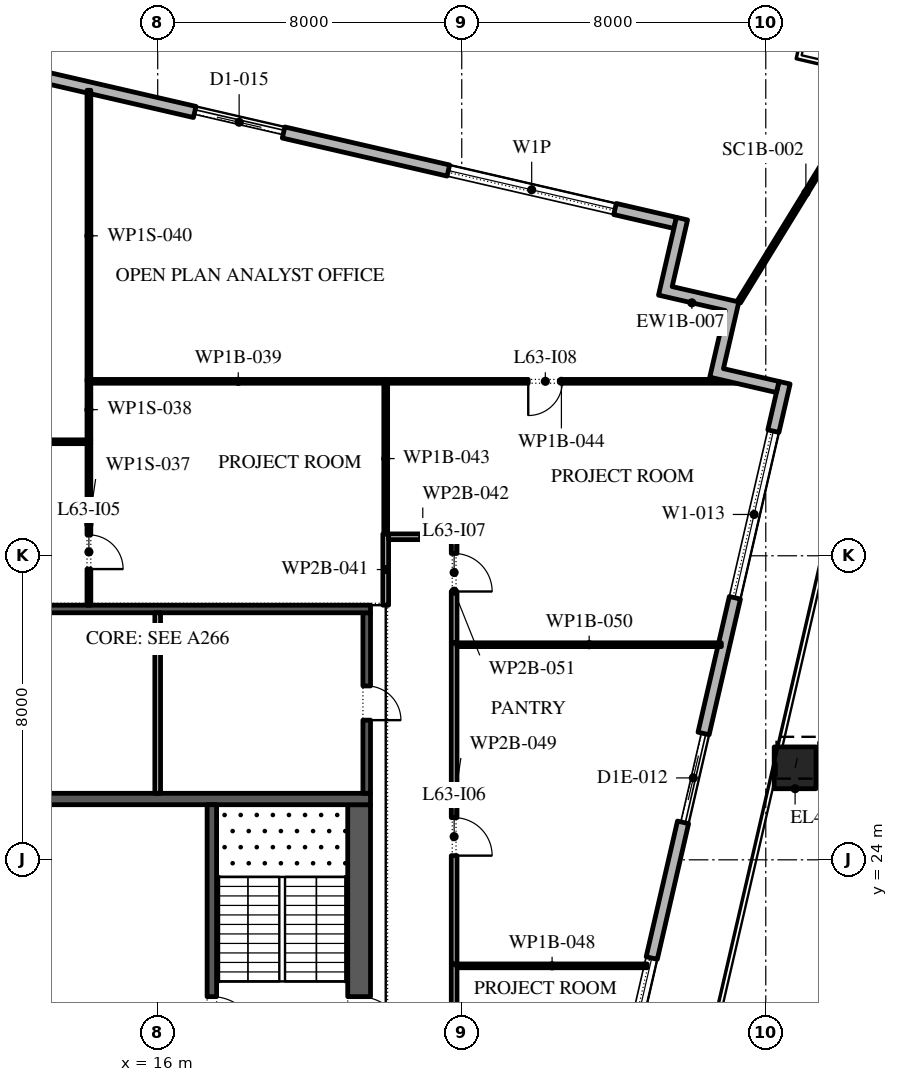
"""IFC4 building model, lengths in metres.
Left out: names, types, materials, properties, quantities, classifications, styles, units other than length and angle.
Written with IfcOpenShell. Run it as: python <this file> out.ifc"""

import sys

from ifc_helpers import new_model, si_unit, direction, frame, frame_2d, origin, origin_2d, place, context, subcontext, project, spatial, polyline, rectangle, outline, extrude, element, fill, save


model = new_model("IFC4")
c1 = context("Model", 3, precision=1e-05, world=origin(), true_north=direction((0.0, 1.0)))
c2 = subcontext(c1, "Body", "Model", "MODEL_VIEW")
j1 = project(units=[si_unit("LENGTHUNIT", "METRE"), si_unit("PLANEANGLEUNIT", "RADIAN")], contexts=[c1])
p1 = place(None, origin())
s1 = spatial("IfcSite", under=j1, at=p1, CompositionType="ELEMENT")
p2 = place(p1, origin())
s2 = spatial("IfcBuilding", under=s1, at=p2, CompositionType="ELEMENT")
p3 = place(p2, frame((0.0, 0.0, 289.2)))
s3 = spatial("IfcBuildingStorey", under=s2, at=p3, CompositionType="ELEMENT", Elevation=289.2)
p4 = place(p3, frame((32.772, 26.421, 0.0), z_axis=(0.014559841898, 0.063111984005, 0.997900239743), x_axis=(-0.97440628778, 0.224794097641, 0.0)))
e1 = element("IfcColumn", 1, at=p4, inside=s3, PredefinedType="COLUMN", context=c2, shape_type="SweptSolid", body=[
    extrude(rectangle(XDim=1.1, YDim=1.1, at=origin_2d()), origin(), (0.0, 0.0, 1.0), 4.209),
])
p5 = place(p3, frame((21.359, -11.678, 0.0), z_axis=(0.0, 0.0, 1.0), x_axis=(0.224949198343, 0.974370493275, 0.0)))
e2 = element("IfcWall", 2, at=p5, inside=s3, PredefinedType="STANDARD", context=c2, shape_type="SweptSolid", body=[
    extrude(rectangle(XDim=49.5, YDim=0.3, at=frame_2d((24.75, 0.0))), origin(), (0.0, 0.0, 1.0), 3.95),
])
p6 = place(p5, frame((1.157, 0.0, 0.45)))
e3 = element("IfcOpeningElement", 3, at=p6, cuts=e2, PredefinedType="OPENING", context=c2, shape_type="SweptSolid", body=[
    extrude(rectangle(XDim=4.5, YDim=3.05, at=frame_2d((2.25, 1.525))), frame((0.0, 0.16, 0.0), z_axis=(0.0, -1.0, 0.0), x_axis=(1.0, 0.0, 0.0)), (0.0, 0.0, 1.0), 0.32),
])
p7 = place(p5, frame((8.121, 0.0, 0.45)))
e4 = element("IfcOpeningElement", 4, at=p7, cuts=e2, PredefinedType="OPENING", context=c2, shape_type="SweptSolid", body=[
    extrude(rectangle(XDim=4.5, YDim=3.05, at=frame_2d((2.25, 1.525))), frame((0.0, 0.16, 0.0), z_axis=(0.0, -1.0, 0.0), x_axis=(1.0, 0.0, 0.0)), (0.0, 0.0, 1.0), 0.32),
])
p8 = place(p5, frame((15.236, 0.0, 0.45)))
e5 = element("IfcOpeningElement", 5, at=p8, cuts=e2, PredefinedType="OPENING", context=c2, shape_type="SweptSolid", body=[
    extrude(rectangle(XDim=4.5, YDim=3.05, at=frame_2d((2.25, 1.525))), frame((0.0, 0.16, 0.0), z_axis=(0.0, -1.0, 0.0), x_axis=(1.0, 0.0, 0.0)), (0.0, 0.0, 1.0), 0.32),
])
p9 = place(p5, frame((22.35, 0.0, 0.45)))
e6 = element("IfcOpeningElement", 6, at=p9, cuts=e2, PredefinedType="OPENING", context=c2, shape_type="SweptSolid", body=[
    extrude(rectangle(XDim=4.5, YDim=3.0, at=frame_2d((2.25, 1.5))), frame((0.0, 0.16, 0.0), z_axis=(0.0, -1.0, 0.0), x_axis=(1.0, 0.0, 0.0)), (0.0, 0.0, 1.0), 0.32),
])
p10 = place(p5, frame((29.464, 0.0, 0.45)))
e7 = element("IfcOpeningElement", 7, at=p10, cuts=e2, PredefinedType="OPENING", context=c2, shape_type="SweptSolid", body=[
    extrude(rectangle(XDim=4.5, YDim=2.9, at=frame_2d((2.25, 1.45))), frame((0.0, 0.16, 0.0), z_axis=(0.0, -1.0, 0.0), x_axis=(1.0, 0.0, 0.0)), (0.0, 0.0, 1.0), 0.32),
])
p11 = place(p5, frame((37.628, 0.0, 0.0)))
e8 = element("IfcOpeningElement", 8, at=p11, cuts=e2, PredefinedType="OPENING", context=c2, shape_type="SweptSolid", body=[
    extrude(rectangle(XDim=2.4, YDim=3.275, at=frame_2d((1.2, 1.637))), frame((0.0, 0.16, 0.0), z_axis=(0.0, -1.0, 0.0), x_axis=(1.0, 0.0, 0.0)), (0.0, 0.0, 1.0), 0.32),
])
p12 = place(p5, frame((43.693, 0.0, 0.45)))
e9 = element("IfcOpeningElement", 9, at=p12, cuts=e2, PredefinedType="OPENING", context=c2, shape_type="SweptSolid", body=[
    extrude(rectangle(XDim=4.5, YDim=3.05, at=frame_2d((2.25, 1.525))), frame((0.0, 0.16, 0.0), z_axis=(0.0, -1.0, 0.0), x_axis=(1.0, 0.0, 0.0)), (0.0, 0.0, 1.0), 0.32),
])
p13 = place(p3, frame((29.616, 40.758, 0.0), z_axis=(0.0, 0.0, 1.0), x_axis=(-0.974370532314, 0.224949029246, 0.0)))
e10 = element("IfcWall", 10, at=p13, inside=s3, PredefinedType="STANDARD", context=c2, shape_type="SweptSolid", body=[
    extrude(rectangle(XDim=48.0, YDim=0.3, at=frame_2d((24.0, 0.0))), origin(), (0.0, 0.0, 1.0), 3.95),
])
p14 = place(p13, frame((1.625, 0.0, 0.45)))
e11 = element("IfcOpeningElement", 11, at=p14, cuts=e10, PredefinedType="OPENING", context=c2, shape_type="SweptSolid", body=[
    extrude(rectangle(XDim=4.5, YDim=2.475, at=frame_2d((2.25, 1.238))), frame((0.0, 0.16, 0.0), z_axis=(0.0, -1.0, 0.0), x_axis=(1.0, 0.0, 0.0)), (0.0, 0.0, 1.0), 0.32),
])
p15 = place(p13, frame((10.575, 0.0, 0.0)))
e12 = element("IfcOpeningElement", 12, at=p15, cuts=e10, PredefinedType="OPENING", context=c2, shape_type="SweptSolid", body=[
    extrude(rectangle(XDim=2.4, YDim=3.5, at=frame_2d((1.2, 1.75))), frame((0.0, 0.16, 0.0), z_axis=(0.0, -1.0, 0.0), x_axis=(1.0, 0.0, 0.0)), (0.0, 0.0, 1.0), 0.32),
])
p16 = place(p13, frame((17.575, 0.0, 0.45)))
e13 = element("IfcOpeningElement", 13, at=p16, cuts=e10, PredefinedType="OPENING", context=c2, shape_type="SweptSolid", body=[
    extrude(rectangle(XDim=4.5, YDim=2.4, at=frame_2d((2.25, 1.2))), frame((0.0, 0.16, 0.0), z_axis=(0.0, -1.0, 0.0), x_axis=(1.0, 0.0, 0.0)), (0.0, 0.0, 1.0), 0.32),
])
p17 = place(p13, frame((25.625, 0.0, 0.45)))
e14 = element("IfcOpeningElement", 14, at=p17, cuts=e10, PredefinedType="OPENING", context=c2, shape_type="SweptSolid", body=[
    extrude(rectangle(XDim=4.5, YDim=2.4, at=frame_2d((2.25, 1.2))), frame((0.0, 0.16, 0.0), z_axis=(0.0, -1.0, 0.0), x_axis=(1.0, 0.0, 0.0)), (0.0, 0.0, 1.0), 0.32),
])
p18 = place(p13, frame((33.675, 0.0, 0.45)))
e15 = element("IfcOpeningElement", 15, at=p18, cuts=e10, PredefinedType="OPENING", context=c2, shape_type="SweptSolid", body=[
    extrude(rectangle(XDim=4.5, YDim=2.4, at=frame_2d((2.25, 1.2))), frame((0.0, 0.16, 0.0), z_axis=(0.0, -1.0, 0.0), x_axis=(1.0, 0.0, 0.0)), (0.0, 0.0, 1.0), 0.32),
])
p19 = place(p13, frame((42.775, 0.0, 0.0)))
e16 = element("IfcOpeningElement", 16, at=p19, cuts=e10, PredefinedType="OPENING", context=c2, shape_type="SweptSolid", body=[
    extrude(rectangle(XDim=2.4, YDim=2.85, at=frame_2d((1.2, 1.425))), frame((0.0, 0.16, 0.0), z_axis=(0.0, -1.0, 0.0), x_axis=(1.0, 0.0, 0.0)), (0.0, 0.0, 1.0), 0.32),
])
p20 = place(p3, origin())
e17 = element("IfcWall", 17, at=p20, inside=s3, PredefinedType="STANDARD", context=c2, shape_type="SweptSolid", body=[
    extrude(outline(polyline([(30.931, 38.453), (29.177, 38.858), (29.65, 40.905), (29.942, 40.837), (29.537, 39.083), (31.291, 38.678), (30.886, 36.924), (32.348, 36.587), (32.28, 36.295), (30.526, 36.699), (30.931, 38.453)])), origin(), (0.0, 0.0, 1.0), 3.95),
])
p21 = place(p3, frame((31.291, 38.678, -0.05), z_axis=(0.0, 0.0, 1.0), x_axis=(0.523490989538, 0.852031210621, 0.0)))
e18 = element("IfcWall", 18, at=p21, inside=s3, PredefinedType="STANDARD", context=c2, shape_type="SweptSolid", body=[
    extrude(rectangle(XDim=6.74, YDim=0.1, at=frame_2d((3.37, 0.0))), origin(), (0.0, 0.0, 1.0), 4.0),
])
p22 = place(p3, frame((21.3, -2.45, 0.0), z_axis=(0.0, 0.0, 1.0), x_axis=(0.0, 1.0, 0.0)))
e19 = element("IfcWall", 19, at=p22, inside=s3, PredefinedType="SHEAR", context=c2, shape_type="SweptSolid", body=[
    extrude(rectangle(XDim=27.9, YDim=0.6, at=frame_2d((13.95, 0.0))), origin(), (0.0, 0.0, 1.0), 3.95),
])
p23 = place(p22, frame((5.05, 0.0, 0.0)))
e20 = element("IfcOpeningElement", 20, at=p23, cuts=e19, PredefinedType="OPENING", context=c2, shape_type="SweptSolid", body=[
    extrude(rectangle(XDim=1.2, YDim=2.1, at=frame_2d((0.6, 1.05))), frame((0.0, 0.31, 0.0), z_axis=(0.0, -1.0, 0.0), x_axis=(1.0, 0.0, 0.0)), (0.0, 0.0, 1.0), 0.62),
])
p24 = place(p22, frame((21.65, 0.0, 0.0)))
e21 = element("IfcOpeningElement", 21, at=p24, cuts=e19, PredefinedType="OPENING", context=c2, shape_type="SweptSolid", body=[
    extrude(rectangle(XDim=1.2, YDim=2.1, at=frame_2d((0.6, 1.05))), frame((0.0, 0.31, 0.0), z_axis=(0.0, -1.0, 0.0), x_axis=(1.0, 0.0, 0.0)), (0.0, 0.0, 1.0), 0.62),
])
p25 = place(p3, frame((10.4, 25.6, 0.0), z_axis=(0.0, 0.0, 1.0), x_axis=(1.0, 0.0, 0.0)))
e22 = element("IfcWall", 22, at=p25, inside=s3, PredefinedType="SHEAR", context=c2, shape_type="SweptSolid", body=[
    extrude(rectangle(XDim=11.2, YDim=0.3, at=frame_2d((5.6, 0.0))), origin(), (0.0, 0.0, 1.0), 3.95),
])
p26 = place(p3, frame((17.425, 19.15, 0.0), z_axis=(0.0, 0.0, 1.0), x_axis=(0.0, 1.0, 0.0)))
e23 = element("IfcWall", 23, at=p26, inside=s3, PredefinedType="SHEAR", context=c2, shape_type="SweptSolid", body=[
    extrude(rectangle(XDim=6.3, YDim=0.25, at=frame_2d((3.15, 0.0))), origin(), (0.0, 0.0, 1.0), 3.95),
])
p27 = place(p26, frame((0.05, 0.0, 0.0)))
e24 = element("IfcOpeningElement", 24, at=p27, cuts=e23, PredefinedType="OPENING", context=c2, shape_type="SweptSolid", body=[
    extrude(rectangle(XDim=1.2, YDim=2.1, at=frame_2d((0.6, 1.05))), frame((0.0, 0.135, 0.0), z_axis=(0.0, -1.0, 0.0), x_axis=(1.0, 0.0, 0.0)), (0.0, 0.0, 1.0), 0.27),
])
p28 = place(p3, frame((21.5, 25.75, 0.0), z_axis=(0.0, 0.0, 1.0), x_axis=(0.0, 1.0, 0.0)))
e25 = element("IfcWall", 25, at=p28, inside=s3, PredefinedType="SHEAR", context=c2, shape_type="SweptSolid", body=[
    extrude(rectangle(XDim=4.75, YDim=0.2, at=frame_2d((2.375, 0.0))), origin(), (0.0, 0.0, 1.0), 3.95),
])
p29 = place(p28, frame((1.925, 0.0, 0.0)))
e26 = element("IfcOpeningElement", 26, at=p29, cuts=e25, PredefinedType="OPENING", context=c2, shape_type="SweptSolid", body=[
    extrude(rectangle(XDim=0.9, YDim=2.1, at=frame_2d((0.45, 1.05))), frame((0.0, 0.11, 0.0), z_axis=(0.0, -1.0, 0.0), x_axis=(1.0, 0.0, 0.0)), (0.0, 0.0, 1.0), 0.22),
])
p30 = place(p3, frame((10.4, 30.6, 0.0), z_axis=(0.0, 0.0, 1.0), x_axis=(1.0, 0.0, 0.0)))
e27 = element("IfcWall", 27, at=p30, inside=s3, PredefinedType="SHEAR", context=c2, shape_type="SweptSolid", body=[
    extrude(rectangle(XDim=11.2, YDim=0.2, at=frame_2d((5.6, 0.0))), origin(), (0.0, 0.0, 1.0), 3.95),
])
p31 = place(p3, frame((16.0, 25.75, 0.0), z_axis=(0.0, 0.0, 1.0), x_axis=(0.0, 1.0, 0.0)))
e28 = element("IfcWall", 28, at=p31, inside=s3, PredefinedType="PARTITIONING", context=c2, shape_type="SweptSolid", body=[
    extrude(rectangle(XDim=4.75, YDim=0.15, at=frame_2d((2.375, 0.0))), origin(), (0.0, 0.0, 1.0), 3.95),
])
p32 = place(p3, frame((14.24, 35.0, 0.0), z_axis=(0.0, 0.0, 1.0), x_axis=(-1.0, 0.0, 0.0)))
e29 = element("IfcWall", 29, at=p32, inside=s3, PredefinedType="PARTITIONING", context=c2, shape_type="SweptSolid", body=[
    extrude(rectangle(XDim=13.175, YDim=0.1, at=frame_2d((6.587, 0.0))), origin(), (0.0, 0.0, 1.0), 3.95),
])
p33 = place(p3, frame((14.19, 34.95, 0.0), z_axis=(0.0, 0.0, 1.0), x_axis=(0.0, -1.0, 0.0)))
e30 = element("IfcWall", 30, at=p33, inside=s3, PredefinedType="PARTITIONING", context=c2, shape_type="SweptSolid", body=[
    extrude(rectangle(XDim=4.25, YDim=0.1, at=frame_2d((2.125, 0.0))), origin(), (0.0, 0.0, 1.0), 2.97),
])
p34 = place(p33, frame((2.4, 0.0, 0.0)))
e31 = element("IfcOpeningElement", 31, at=p34, cuts=e30, PredefinedType="OPENING", context=c2, shape_type="SweptSolid", body=[
    extrude(rectangle(XDim=0.9, YDim=2.1, at=frame_2d((0.45, 1.05))), frame((0.0, 0.06, 0.0), z_axis=(0.0, -1.0, 0.0), x_axis=(1.0, 0.0, 0.0)), (0.0, 0.0, 1.0), 0.12),
])
p35 = place(p3, frame((14.19, 36.64, 0.0), z_axis=(0.0, 0.0, 1.0), x_axis=(0.0, -1.0, 0.0)))
e32 = element("IfcWall", 32, at=p35, inside=s3, PredefinedType="PARTITIONING", context=c2, shape_type="SweptSolid", body=[
    extrude(rectangle(XDim=1.59, YDim=0.1, at=frame_2d((0.795, 0.0))), origin(), (0.0, 0.0, 1.0), 2.97),
])
p36 = place(p3, frame((14.24, 36.59, 0.0), z_axis=(0.0, 0.0, 1.0), x_axis=(1.0, 0.0, 0.0)))
e33 = element("IfcWall", 33, at=p36, inside=s3, PredefinedType="PARTITIONING", context=c2, shape_type="SweptSolid", body=[
    extrude(rectangle(XDim=7.76, YDim=0.1, at=frame_2d((3.88, 0.0))), origin(), (0.0, 0.0, 1.0), 3.95),
])
p37 = place(p3, frame((14.19, 44.248, 0.0), z_axis=(0.0, 0.0, 1.0), x_axis=(0.0, -1.0, 0.0)))
e34 = element("IfcWall", 34, at=p37, inside=s3, PredefinedType="PARTITIONING", context=c2, shape_type="SweptSolid", body=[
    extrude(rectangle(XDim=7.658, YDim=0.1, at=frame_2d((3.829, 0.0))), origin(), (0.0, 0.0, 1.0), 2.97),
])
p38 = place(p3, frame((22.0, 30.7, 0.0), z_axis=(0.0, 0.0, 1.0), x_axis=(0.0, 1.0, 0.0)))
e35 = element("IfcWall", 35, at=p38, inside=s3, PredefinedType="PARTITIONING", context=c2, shape_type="SweptSolid", body=[
    extrude(rectangle(XDim=1.875, YDim=0.15, at=frame_2d((0.938, 0.0))), origin(), (0.0, 0.0, 1.0), 3.95),
])
p39 = place(p3, frame((22.075, 32.5, 0.0), z_axis=(0.0, 0.0, 1.0), x_axis=(1.0, 0.0, 0.0)))
e36 = element("IfcWall", 36, at=p39, inside=s3, PredefinedType="PARTITIONING", context=c2, shape_type="SweptSolid", body=[
    extrude(rectangle(XDim=1.8, YDim=0.15, at=frame_2d((0.9, 0.0))), origin(), (0.0, 0.0, 1.0), 3.95),
])
p40 = place(p3, frame((22.0, 36.54, 0.0), z_axis=(0.0, 0.0, 1.0), x_axis=(0.0, -1.0, 0.0)))
e37 = element("IfcWall", 37, at=p40, inside=s3, PredefinedType="PARTITIONING", context=c2, shape_type="SweptSolid", body=[
    extrude(rectangle(XDim=3.965, YDim=0.1, at=frame_2d((1.982, 0.0))), origin(), (0.0, 0.0, 1.0), 3.95),
])
p41 = place(p3, frame((22.0, 36.59, 0.0), z_axis=(0.0, 0.0, 1.0), x_axis=(1.0, 0.0, 0.0)))
e38 = element("IfcWall", 38, at=p41, inside=s3, PredefinedType="PARTITIONING", context=c2, shape_type="SweptSolid", body=[
    extrude(rectangle(XDim=9.245, YDim=0.1, at=frame_2d((4.623, 0.0))), origin(), (0.0, 0.0, 1.0), 3.95),
])
p42 = place(p41, frame((3.75, 0.0, 0.0)))
e39 = element("IfcOpeningElement", 39, at=p42, cuts=e38, PredefinedType="OPENING", context=c2, shape_type="SweptSolid", body=[
    extrude(rectangle(XDim=0.9, YDim=2.1, at=frame_2d((0.45, 1.05))), frame((0.0, 0.06, 0.0), z_axis=(0.0, -1.0, 0.0), x_axis=(1.0, 0.0, 0.0)), (0.0, 0.0, 1.0), 0.12),
])
p43 = place(p3, frame((23.8, 21.26, 0.0), z_axis=(0.0, 0.0, 1.0), x_axis=(0.0, -1.0, 0.0)))
e40 = element("IfcWall", 40, at=p43, inside=s3, PredefinedType="PARTITIONING", context=c2, shape_type="SweptSolid", body=[
    extrude(rectangle(XDim=18.325, YDim=0.15, at=frame_2d((9.163, 0.0))), origin(), (0.0, 0.0, 1.0), 3.95),
])
p44 = place(p43, frame((5.0, 0.0, 0.0)))
e41 = element("IfcOpeningElement", 41, at=p44, cuts=e40, PredefinedType="OPENING", context=c2, shape_type="SweptSolid", body=[
    extrude(rectangle(XDim=1.0, YDim=2.1, at=frame_2d((0.5, 1.05))), frame((0.0, 0.085, 0.0), z_axis=(0.0, -1.0, 0.0), x_axis=(1.0, 0.0, 0.0)), (0.0, 0.0, 1.0), 0.17),
])
p45 = place(p3, frame((23.875, 21.21, 0.0), z_axis=(0.0, 0.0, 1.0), x_axis=(1.0, 0.0, 0.0)))
e42 = element("IfcWall", 42, at=p45, inside=s3, PredefinedType="PARTITIONING", context=c2, shape_type="SweptSolid", body=[
    extrude(rectangle(XDim=5.005, YDim=0.1, at=frame_2d((2.502, 0.0))), origin(), (0.0, 0.0, 1.0), 3.95),
])
p46 = place(p3, frame((23.8, 29.71, 0.0), z_axis=(0.0, 0.0, 1.0), x_axis=(0.0, -1.0, 0.0)))
e43 = element("IfcWall", 43, at=p46, inside=s3, PredefinedType="PARTITIONING", context=c2, shape_type="SweptSolid", body=[
    extrude(rectangle(XDim=8.45, YDim=0.15, at=frame_2d((4.225, 0.0))), origin(), (0.0, 0.0, 1.0), 3.95),
])
p47 = place(p46, frame((4.6, 0.0, 0.0)))
e44 = element("IfcOpeningElement", 44, at=p47, cuts=e43, PredefinedType="OPENING", context=c2, shape_type="SweptSolid", body=[
    extrude(rectangle(XDim=1.0, YDim=2.1, at=frame_2d((0.5, 1.05))), frame((0.0, 0.085, 0.0), z_axis=(0.0, -1.0, 0.0), x_axis=(1.0, 0.0, 0.0)), (0.0, 0.0, 1.0), 0.17),
])
p48 = place(p3, frame((23.875, 29.66, 0.0), z_axis=(0.0, 0.0, 1.0), x_axis=(1.0, 0.0, 0.0)))
e45 = element("IfcWall", 45, at=p48, inside=s3, PredefinedType="PARTITIONING", context=c2, shape_type="SweptSolid", body=[
    extrude(rectangle(XDim=6.956, YDim=0.1, at=frame_2d((3.478, 0.0))), origin(), (0.0, 0.0, 1.0), 3.95),
])
p49 = place(p3, frame((23.8, 32.425, 0.0), z_axis=(0.0, 0.0, 1.0), x_axis=(0.0, -1.0, 0.0)))
e46 = element("IfcWall", 46, at=p49, inside=s3, PredefinedType="PARTITIONING", context=c2, shape_type="SweptSolid", body=[
    extrude(rectangle(XDim=2.715, YDim=0.15, at=frame_2d((1.357, 0.0))), origin(), (0.0, 0.0, 1.0), 3.95),
])
p50 = place(p49, frame((0.365, 0.0, 0.0)))
e47 = element("IfcOpeningElement", 47, at=p50, cuts=e46, PredefinedType="OPENING", context=c2, shape_type="SweptSolid", body=[
    extrude(rectangle(XDim=1.0, YDim=2.1, at=frame_2d((0.5, 1.05))), frame((0.0, 0.085, 0.0), z_axis=(0.0, -1.0, 0.0), x_axis=(1.0, 0.0, 0.0)), (0.0, 0.0, 1.0), 0.17),
])
p51 = place(p10, origin())
e48 = element("IfcWindow", 48, at=p51, inside=s3, PartitioningType="DOUBLE_PANEL_VERTICAL", PredefinedType="WINDOW", context=c2, shape_type="SweptSolid", body=[
    extrude(rectangle(XDim=4.5, YDim=2.9, at=frame_2d((2.25, 1.45))), frame((0.0, 0.03, 0.0), z_axis=(0.0, -1.0, 0.0), x_axis=(1.0, 0.0, 0.0)), (0.0, 0.0, 1.0), 0.06),
])
fill(e7, e48)
p52 = place(p11, origin())
e49 = element("IfcDoor", 49, at=p52, inside=s3, OperationType="DOUBLE_DOOR_SLIDING", PredefinedType="DOOR", context=c2, shape_type="SweptSolid", body=[
    extrude(rectangle(XDim=2.4, YDim=3.275, at=frame_2d((1.2, 1.637))), frame((0.0, 0.025, 0.0), z_axis=(0.0, -1.0, 0.0), x_axis=(1.0, 0.0, 0.0)), (0.0, 0.0, 1.0), 0.05),
])
fill(e8, e49)
p53 = place(p12, origin())
e50 = element("IfcWindow", 50, at=p53, inside=s3, PartitioningType="DOUBLE_PANEL_VERTICAL", PredefinedType="WINDOW", context=c2, shape_type="SweptSolid", body=[
    extrude(rectangle(XDim=4.5, YDim=3.05, at=frame_2d((2.25, 1.525))), frame((0.0, 0.03, 0.0), z_axis=(0.0, -1.0, 0.0), x_axis=(1.0, 0.0, 0.0)), (0.0, 0.0, 1.0), 0.06),
])
fill(e9, e50)
p54 = place(p14, origin())
e51 = element("IfcWindow", 51, at=p54, inside=s3, PartitioningType="DOUBLE_PANEL_VERTICAL", PredefinedType="WINDOW", context=c2, shape_type="SweptSolid", body=[
    extrude(rectangle(XDim=4.5, YDim=2.475, at=frame_2d((2.25, 1.238))), frame((0.0, 0.03, 0.0), z_axis=(0.0, -1.0, 0.0), x_axis=(1.0, 0.0, 0.0)), (0.0, 0.0, 1.0), 0.06),
])
fill(e11, e51)
p55 = place(p15, origin())
e52 = element("IfcDoor", 52, at=p55, inside=s3, OperationType="DOUBLE_DOOR_SLIDING", PredefinedType="DOOR", context=c2, shape_type="SweptSolid", body=[
    extrude(rectangle(XDim=2.4, YDim=3.5, at=frame_2d((1.2, 1.75))), frame((0.0, 0.025, 0.0), z_axis=(0.0, -1.0, 0.0), x_axis=(1.0, 0.0, 0.0)), (0.0, 0.0, 1.0), 0.05),
])
fill(e12, e52)
p56 = place(p27, frame((1.2, 0.0, 0.0), z_axis=(0.0, 0.0, 1.0), x_axis=(-1.0, 0.0, 0.0)))
e53 = element("IfcDoor", 53, at=p56, inside=s3, OperationType="SINGLE_SWING_LEFT", PredefinedType="DOOR", context=c2, shape_type="SweptSolid", body=[
    extrude(rectangle(XDim=1.2, YDim=2.1, at=frame_2d((0.6, 1.05))), frame((0.0, 0.025, 0.0), z_axis=(0.0, -1.0, 0.0), x_axis=(1.0, 0.0, 0.0)), (0.0, 0.0, 1.0), 0.05),
])
fill(e24, e53)
p57 = place(p24, frame((1.2, 0.0, 0.0), z_axis=(0.0, 0.0, 1.0), x_axis=(-1.0, 0.0, 0.0)))
e54 = element("IfcDoor", 54, at=p57, inside=s3, OperationType="SINGLE_SWING_LEFT", PredefinedType="DOOR", context=c2, shape_type="SweptSolid", body=[
    extrude(rectangle(XDim=1.2, YDim=2.1, at=frame_2d((0.6, 1.05))), frame((0.0, 0.025, 0.0), z_axis=(0.0, -1.0, 0.0), x_axis=(1.0, 0.0, 0.0)), (0.0, 0.0, 1.0), 0.05),
])
fill(e21, e54)
p58 = place(p29, frame((0.9, 0.15, 0.0), z_axis=(0.0, 0.0, 1.0), x_axis=(-1.0, 0.0, 0.0)))
e55 = element("IfcDoor", 55, at=p58, inside=s3, OperationType="SINGLE_SWING_LEFT", PredefinedType="DOOR", context=c2, shape_type="SweptSolid", body=[
    extrude(rectangle(XDim=0.9, YDim=2.1, at=frame_2d((0.45, 1.05))), frame((0.0, 0.1, 0.0), z_axis=(0.0, -1.0, 0.0), x_axis=(1.0, 0.0, 0.0)), (0.0, 0.0, 1.0), 0.05),
])
fill(e26, e55)
p59 = place(p34, origin())
e56 = element("IfcDoor", 56, at=p59, inside=s3, OperationType="SINGLE_SWING_LEFT", PredefinedType="DOOR", context=c2, shape_type="SweptSolid", body=[
    extrude(rectangle(XDim=0.9, YDim=2.1, at=frame_2d((0.45, 1.05))), frame((0.0, 0.025, 0.0), z_axis=(0.0, -1.0, 0.0), x_axis=(1.0, 0.0, 0.0)), (0.0, 0.0, 1.0), 0.05),
])
fill(e31, e56)
p60 = place(p47, origin())
e57 = element("IfcDoor", 57, at=p60, inside=s3, OperationType="SINGLE_SWING_LEFT", PredefinedType="DOOR", context=c2, shape_type="SweptSolid", body=[
    extrude(rectangle(XDim=1.0, YDim=2.1, at=frame_2d((0.5, 1.05))), frame((0.0, 0.025, 0.0), z_axis=(0.0, -1.0, 0.0), x_axis=(1.0, 0.0, 0.0)), (0.0, 0.0, 1.0), 0.05),
])
fill(e44, e57)
p61 = place(p50, origin())
e58 = element("IfcDoor", 58, at=p61, inside=s3, OperationType="SINGLE_SWING_LEFT", PredefinedType="DOOR", context=c2, shape_type="SweptSolid", body=[
    extrude(rectangle(XDim=1.0, YDim=2.1, at=frame_2d((0.5, 1.05))), frame((0.0, 0.025, 0.0), z_axis=(0.0, -1.0, 0.0), x_axis=(1.0, 0.0, 0.0)), (0.0, 0.0, 1.0), 0.05),
])
fill(e47, e58)
p62 = place(p42, frame((0.9, 0.0, 0.0), z_axis=(0.0, 0.0, 1.0), x_axis=(-1.0, 0.0, 0.0)))
e59 = element("IfcDoor", 59, at=p62, inside=s3, OperationType="SINGLE_SWING_LEFT", PredefinedType="DOOR", context=c2, shape_type="SweptSolid", body=[
    extrude(rectangle(XDim=0.9, YDim=2.1, at=frame_2d((0.45, 1.05))), frame((0.0, 0.025, 0.0), z_axis=(0.0, -1.0, 0.0), x_axis=(1.0, 0.0, 0.0)), (0.0, 0.0, 1.0), 0.05),
])
fill(e39, e59)
save(model, sys.argv[1])
